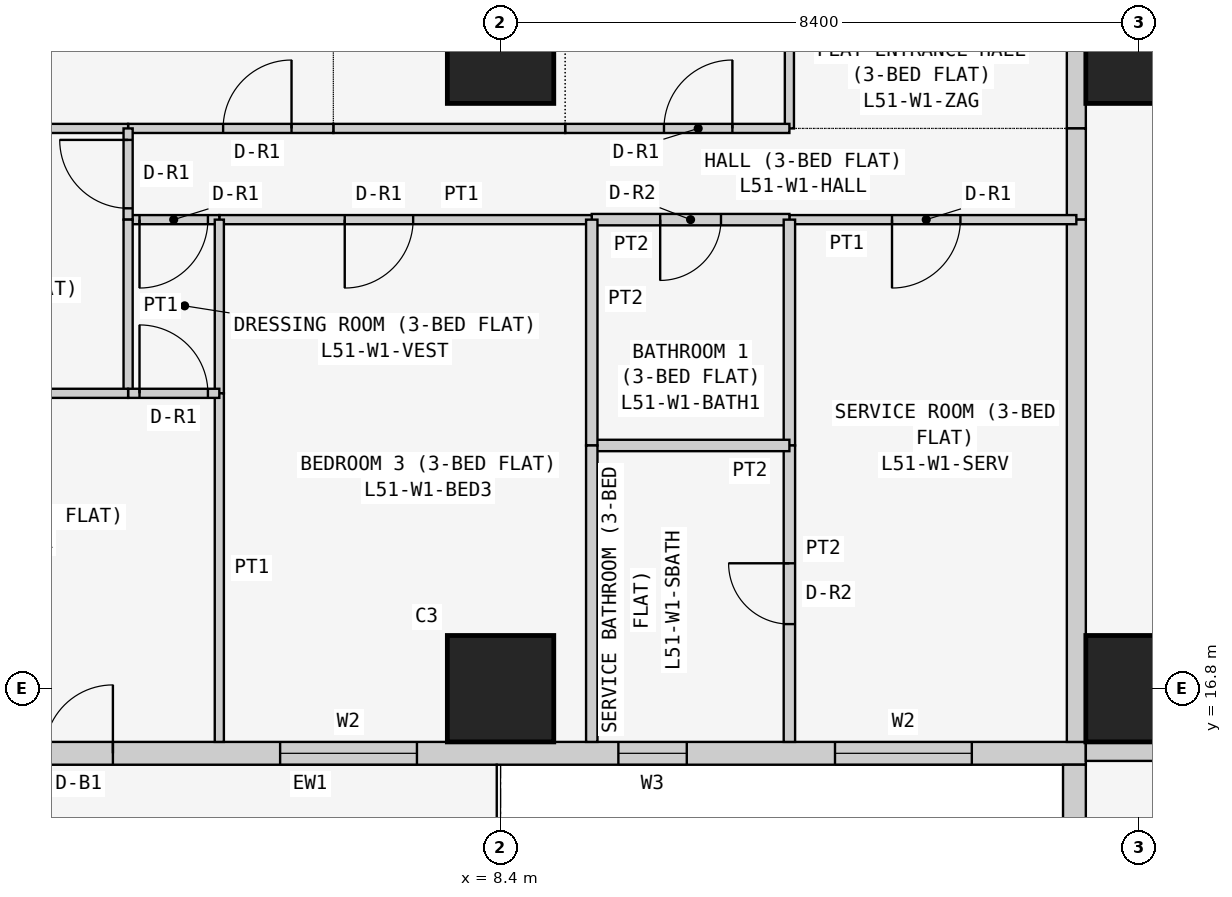
"""IFC4 building model, lengths in metres.
Left out: names, types, materials, properties, quantities, classifications, styles, units other than length and angle.
Written with IfcOpenShell. Run it as: python <this file> out.ifc"""

import sys

from ifc_helpers import new_model, si_unit, direction, frame, frame_2d, origin, origin_2d, place, context, subcontext, project, spatial, rectangle, extrude, element, fill, save


model = new_model("IFC4")
c1 = context("Model", 3, precision=1e-05, world=origin(), true_north=direction((0.0, 1.0)))
c2 = subcontext(c1, "Body", "Model", "MODEL_VIEW")
j1 = project(units=[si_unit("LENGTHUNIT", "METRE"), si_unit("PLANEANGLEUNIT", "RADIAN")], contexts=[c1])
p1 = place(None, origin())
s1 = spatial("IfcSite", under=j1, at=p1, CompositionType="ELEMENT")
p2 = place(p1, origin())
s2 = spatial("IfcBuilding", under=s1, at=p2, CompositionType="ELEMENT")
p3 = place(p2, frame((0.0, 0.0, 197.7)))
s3 = spatial("IfcBuildingStorey", under=s2, at=p3, CompositionType="ELEMENT", Elevation=197.7)
for number, where, z_axis, x_axis in (
    (1, (8.4, 16.8, 0.0), (0.0, 0.0, 1.0), (1.0, 0.0, 0.0)),
    (2, (8.4, 25.2, 0.0), (0.0, 0.0, 1.0), (1.0, 0.0, 0.0)),
    (3, (16.8, 16.8, 0.0), (0.0, 0.0, 1.0), (1.0, 0.0, 0.0)),
    (4, (16.8, 25.2, 0.0), (0.0, 0.0, 1.0), (1.0, 0.0, 0.0)),
):
    element("IfcColumn", number, at=place(p3, frame(where, z_axis=z_axis, x_axis=x_axis)), inside=s3, PredefinedType="COLUMN", context=c2, shape_type="SweptSolid", body=[
        extrude(rectangle(XDim=1.4, YDim=1.4, at=origin_2d()), origin(), (0.0, 0.0, 1.0), 3.6),
    ])
p4 = place(p3, frame((0.4, 15.95, 0.0), z_axis=(0.0, 0.0, 1.0), x_axis=(1.0, 0.0, 0.0)))
e5 = element("IfcWall", 5, at=p4, inside=s3, PredefinedType="SOLIDWALL", context=c2, shape_type="SweptSolid", body=[
    extrude(rectangle(XDim=15.7, YDim=0.3, at=frame_2d((7.85, 0.0))), origin(), (0.0, 0.0, 1.0), 3.45),
])
p5 = place(p4, frame((12.4, 0.0, 0.9)))
e6 = element("IfcOpeningElement", 6, at=p5, cuts=e5, PredefinedType="OPENING", context=c2, shape_type="SweptSolid", body=[
    extrude(rectangle(XDim=1.8, YDim=1.5, at=frame_2d((0.9, 0.75))), frame((0.0, 0.16, 0.0), z_axis=(0.0, -1.0, 0.0), x_axis=(1.0, 0.0, 0.0)), (0.0, 0.0, 1.0), 0.32),
])
p6 = place(p4, frame((9.55, 0.0, 1.5)))
e7 = element("IfcOpeningElement", 7, at=p6, cuts=e5, PredefinedType="OPENING", context=c2, shape_type="SweptSolid", body=[
    extrude(rectangle(XDim=0.9, YDim=0.7, at=frame_2d((0.45, 0.35))), frame((0.0, 0.16, 0.0), z_axis=(0.0, -1.0, 0.0), x_axis=(1.0, 0.0, 0.0)), (0.0, 0.0, 1.0), 0.32),
])
p7 = place(p4, frame((5.1, 0.0, 0.9)))
e8 = element("IfcOpeningElement", 8, at=p7, cuts=e5, PredefinedType="OPENING", context=c2, shape_type="SweptSolid", body=[
    extrude(rectangle(XDim=1.8, YDim=1.5, at=frame_2d((0.9, 0.75))), frame((0.0, 0.16, 0.0), z_axis=(0.0, -1.0, 0.0), x_axis=(1.0, 0.0, 0.0)), (0.0, 0.0, 1.0), 0.32),
])
p8 = place(p4, frame((2.0, 0.0, 0.0)))
e9 = element("IfcOpeningElement", 9, at=p8, cuts=e5, PredefinedType="OPENING", context=c2, shape_type="SweptSolid", body=[
    extrude(rectangle(XDim=0.9, YDim=2.4, at=frame_2d((0.45, 1.2))), frame((0.0, 0.16, 0.0), z_axis=(0.0, -1.0, 0.0), x_axis=(1.0, 0.0, 0.0)), (0.0, 0.0, 1.0), 0.32),
])
p9 = place(p4, frame((0.7, 0.0, 0.9)))
e10 = element("IfcOpeningElement", 10, at=p9, cuts=e5, PredefinedType="OPENING", context=c2, shape_type="SweptSolid", body=[
    extrude(rectangle(XDim=1.2, YDim=1.5, at=frame_2d((0.6, 0.75))), frame((0.0, 0.16, 0.0), z_axis=(0.0, -1.0, 0.0), x_axis=(1.0, 0.0, 0.0)), (0.0, 0.0, 1.0), 0.32),
])
p10 = place(p3, frame((15.95, 15.8, 0.0), z_axis=(0.0, 0.0, 1.0), x_axis=(0.0, -1.0, 0.0)))
e11 = element("IfcWall", 11, at=p10, inside=s3, PredefinedType="SOLIDWALL", context=c2, shape_type="SweptSolid", body=[
    extrude(rectangle(XDim=7.0, YDim=0.3, at=frame_2d((3.5, 0.0))), origin(), (0.0, 0.0, 1.0), 3.45),
])
p11 = place(p10, frame((1.5, 0.0, 0.9)))
e12 = element("IfcOpeningElement", 12, at=p11, cuts=e11, PredefinedType="OPENING", context=c2, shape_type="SweptSolid", body=[
    extrude(rectangle(XDim=2.4, YDim=1.5, at=frame_2d((1.2, 0.75))), frame((0.0, 0.16, 0.0), z_axis=(0.0, -1.0, 0.0), x_axis=(1.0, 0.0, 0.0)), (0.0, 0.0, 1.0), 0.32),
])
p12 = place(p10, frame((5.05, 0.0, 0.9)))
e13 = element("IfcOpeningElement", 13, at=p12, cuts=e11, PredefinedType="OPENING", context=c2, shape_type="SweptSolid", body=[
    extrude(rectangle(XDim=1.2, YDim=1.5, at=frame_2d((0.6, 0.75))), frame((0.0, 0.16, 0.0), z_axis=(0.0, -1.0, 0.0), x_axis=(1.0, 0.0, 0.0)), (0.0, 0.0, 1.0), 0.32),
])
p13 = place(p3, frame((22.971, 15.975, 0.0), z_axis=(0.0, 0.0, 1.0), x_axis=(-1.0, 0.0, 0.0)))
e14 = element("IfcWall", 14, at=p13, inside=s3, PredefinedType="PARTITIONING", context=c2, shape_type="SweptSolid", body=[
    extrude(rectangle(XDim=6.871, YDim=0.25, at=frame_2d((3.436, 0.0))), origin(), (0.0, 0.0, 1.0), 3.45),
])
p14 = place(p3, frame((15.975, 24.171, 0.0), z_axis=(0.0, 0.0, 1.0), x_axis=(0.0, 1.0, 0.0)))
e15 = element("IfcWall", 15, at=p14, inside=s3, PredefinedType="PARTITIONING", context=c2, shape_type="SweptSolid", body=[
    extrude(rectangle(XDim=5.229, YDim=0.25, at=frame_2d((2.615, 0.0))), origin(), (0.0, 0.0, 1.0), 3.45),
])
p15 = place(p14, frame((2.129, 0.0, 0.0)))
e16 = element("IfcOpeningElement", 16, at=p15, cuts=e15, PredefinedType="OPENING", context=c2, shape_type="SweptSolid", body=[
    extrude(rectangle(XDim=1.0, YDim=2.1, at=frame_2d((0.5, 1.05))), frame((0.0, 0.135, 0.0), z_axis=(0.0, -1.0, 0.0), x_axis=(1.0, 0.0, 0.0)), (0.0, 0.0, 1.0), 0.27),
])
p16 = place(p3, frame((15.975, 22.971, 0.0), z_axis=(0.0, 0.0, 1.0), x_axis=(0.0, 1.0, 0.0)))
e17 = element("IfcWall", 17, at=p16, inside=s3, PredefinedType="PARTITIONING", context=c2, shape_type="SweptSolid", body=[
    extrude(rectangle(XDim=1.2, YDim=0.25, at=frame_2d((0.6, 0.0))), origin(), (0.0, 0.0, 1.0), 3.45),
])
p17 = place(p3, frame((15.975, 16.1, 0.0), z_axis=(0.0, 0.0, 1.0), x_axis=(0.0, 1.0, 0.0)))
e18 = element("IfcWall", 18, at=p17, inside=s3, PredefinedType="PARTITIONING", context=c2, shape_type="SweptSolid", body=[
    extrude(rectangle(XDim=6.871, YDim=0.25, at=frame_2d((3.436, 0.0))), origin(), (0.0, 0.0, 1.0), 3.45),
])
p18 = place(p3, frame((12.2, 29.4, 0.0), z_axis=(0.0, 0.0, 1.0), x_axis=(0.0, -1.0, 0.0)))
e19 = element("IfcWall", 19, at=p18, inside=s3, PredefinedType="PARTITIONING", context=c2, shape_type="SweptSolid", body=[
    extrude(rectangle(XDim=5.229, YDim=0.12, at=frame_2d((2.615, 0.0))), origin(), (0.0, 0.0, 1.0), 3.45),
])
p19 = place(p3, frame((9.25, 24.171, 0.0), z_axis=(0.0, 0.0, 1.0), x_axis=(1.0, 0.0, 0.0)))
e20 = element("IfcWall", 20, at=p19, inside=s3, PredefinedType="PARTITIONING", context=c2, shape_type="SweptSolid", body=[
    extrude(rectangle(XDim=2.95, YDim=0.12, at=frame_2d((1.475, 0.0))), origin(), (0.0, 0.0, 1.0), 3.45),
])
p20 = place(p19, frame((1.3, 0.0, 0.0)))
e21 = element("IfcOpeningElement", 21, at=p20, cuts=e20, PredefinedType="OPENING", context=c2, shape_type="SweptSolid", body=[
    extrude(rectangle(XDim=0.9, YDim=2.1, at=frame_2d((0.45, 1.05))), frame((0.0, 0.07, 0.0), z_axis=(0.0, -1.0, 0.0), x_axis=(1.0, 0.0, 0.0)), (0.0, 0.0, 1.0), 0.14),
])
p21 = place(p3, frame((6.2, 24.171, 0.0), z_axis=(0.0, 0.0, 1.0), x_axis=(1.0, 0.0, 0.0)))
e22 = element("IfcWall", 22, at=p21, inside=s3, PredefinedType="PARTITIONING", context=c2, shape_type="SweptSolid", body=[
    extrude(rectangle(XDim=3.05, YDim=0.12, at=frame_2d((1.525, 0.0))), origin(), (0.0, 0.0, 1.0), 3.45),
])
p22 = place(p3, frame((3.5, 24.171, 0.0), z_axis=(0.0, 0.0, 1.0), x_axis=(1.0, 0.0, 0.0)))
e23 = element("IfcWall", 23, at=p22, inside=s3, PredefinedType="PARTITIONING", context=c2, shape_type="SweptSolid", body=[
    extrude(rectangle(XDim=2.7, YDim=0.12, at=frame_2d((1.35, 0.0))), origin(), (0.0, 0.0, 1.0), 3.45),
])
p23 = place(p22, frame((1.25, 0.0, 0.0)))
e24 = element("IfcOpeningElement", 24, at=p23, cuts=e23, PredefinedType="OPENING", context=c2, shape_type="SweptSolid", body=[
    extrude(rectangle(XDim=0.9, YDim=2.1, at=frame_2d((0.45, 1.05))), frame((0.0, 0.07, 0.0), z_axis=(0.0, -1.0, 0.0), x_axis=(1.0, 0.0, 0.0)), (0.0, 0.0, 1.0), 0.14),
])
p24 = place(p3, frame((-0.65, 24.171, 0.0), z_axis=(0.0, 0.0, 1.0), x_axis=(1.0, 0.0, 0.0)))
e25 = element("IfcWall", 25, at=p24, inside=s3, PredefinedType="PARTITIONING", context=c2, shape_type="SweptSolid", body=[
    extrude(rectangle(XDim=4.15, YDim=0.12, at=frame_2d((2.075, 0.0))), origin(), (0.0, 0.0, 1.0), 3.45),
])
p25 = place(p3, frame((12.2, 22.971, 0.0), z_axis=(0.0, 0.0, 1.0), x_axis=(1.0, 0.0, 0.0)))
e26 = element("IfcWall", 26, at=p25, inside=s3, PredefinedType="PARTITIONING", context=c2, shape_type="SweptSolid", body=[
    extrude(rectangle(XDim=3.775, YDim=0.12, at=frame_2d((1.888, 0.0))), origin(), (0.0, 0.0, 1.0), 3.45),
])
p26 = place(p25, frame((1.35, 0.0, 0.0)))
e27 = element("IfcOpeningElement", 27, at=p26, cuts=e26, PredefinedType="OPENING", context=c2, shape_type="SweptSolid", body=[
    extrude(rectangle(XDim=0.9, YDim=2.1, at=frame_2d((0.45, 1.05))), frame((0.0, 0.07, 0.0), z_axis=(0.0, -1.0, 0.0), x_axis=(1.0, 0.0, 0.0)), (0.0, 0.0, 1.0), 0.14),
])
p27 = place(p3, frame((9.6, 22.971, 0.0), z_axis=(0.0, 0.0, 1.0), x_axis=(1.0, 0.0, 0.0)))
e28 = element("IfcWall", 28, at=p27, inside=s3, PredefinedType="PARTITIONING", context=c2, shape_type="SweptSolid", body=[
    extrude(rectangle(XDim=2.6, YDim=0.15, at=frame_2d((1.3, 0.0))), origin(), (0.0, 0.0, 1.0), 3.45),
])
p28 = place(p27, frame((0.9, 0.0, 0.0)))
e29 = element("IfcOpeningElement", 29, at=p28, cuts=e28, PredefinedType="OPENING", context=c2, shape_type="SweptSolid", body=[
    extrude(rectangle(XDim=0.8, YDim=2.1, at=frame_2d((0.4, 1.05))), frame((0.0, 0.085, 0.0), z_axis=(0.0, -1.0, 0.0), x_axis=(1.0, 0.0, 0.0)), (0.0, 0.0, 1.0), 0.17),
])
p29 = place(p3, frame((4.7, 22.971, 0.0), z_axis=(0.0, 0.0, 1.0), x_axis=(1.0, 0.0, 0.0)))
e30 = element("IfcWall", 30, at=p29, inside=s3, PredefinedType="PARTITIONING", context=c2, shape_type="SweptSolid", body=[
    extrude(rectangle(XDim=4.9, YDim=0.12, at=frame_2d((2.45, 0.0))), origin(), (0.0, 0.0, 1.0), 3.45),
])
p30 = place(p29, frame((1.65, 0.0, 0.0)))
e31 = element("IfcOpeningElement", 31, at=p30, cuts=e30, PredefinedType="OPENING", context=c2, shape_type="SweptSolid", body=[
    extrude(rectangle(XDim=0.9, YDim=2.1, at=frame_2d((0.45, 1.05))), frame((0.0, 0.07, 0.0), z_axis=(0.0, -1.0, 0.0), x_axis=(1.0, 0.0, 0.0)), (0.0, 0.0, 1.0), 0.14),
])
p31 = place(p3, frame((3.5, 22.971, 0.0), z_axis=(0.0, 0.0, 1.0), x_axis=(1.0, 0.0, 0.0)))
e32 = element("IfcWall", 32, at=p31, inside=s3, PredefinedType="PARTITIONING", context=c2, shape_type="SweptSolid", body=[
    extrude(rectangle(XDim=1.2, YDim=0.12, at=frame_2d((0.6, 0.0))), origin(), (0.0, 0.0, 1.0), 3.45),
])
p32 = place(p31, frame((0.15, 0.0, 0.0)))
e33 = element("IfcOpeningElement", 33, at=p32, cuts=e32, PredefinedType="OPENING", context=c2, shape_type="SweptSolid", body=[
    extrude(rectangle(XDim=0.9, YDim=2.1, at=frame_2d((0.45, 1.05))), frame((0.0, 0.07, 0.0), z_axis=(0.0, -1.0, 0.0), x_axis=(1.0, 0.0, 0.0)), (0.0, 0.0, 1.0), 0.14),
])
p33 = place(p3, frame((3.5, 24.171, 0.0), z_axis=(0.0, 0.0, 1.0), x_axis=(0.0, -1.0, 0.0)))
e34 = element("IfcWall", 34, at=p33, inside=s3, PredefinedType="PARTITIONING", context=c2, shape_type="SweptSolid", body=[
    extrude(rectangle(XDim=1.2, YDim=0.12, at=frame_2d((0.6, 0.0))), origin(), (0.0, 0.0, 1.0), 3.45),
])
p34 = place(p33, frame((0.151, 0.0, 0.0)))
e35 = element("IfcOpeningElement", 35, at=p34, cuts=e34, PredefinedType="OPENING", context=c2, shape_type="SweptSolid", body=[
    extrude(rectangle(XDim=0.9, YDim=2.1, at=frame_2d((0.45, 1.05))), frame((0.0, 0.07, 0.0), z_axis=(0.0, -1.0, 0.0), x_axis=(1.0, 0.0, 0.0)), (0.0, 0.0, 1.0), 0.14),
])
p35 = place(p3, frame((12.2, 22.971, 0.0), z_axis=(0.0, 0.0, 1.0), x_axis=(0.0, -1.0, 0.0)))
e36 = element("IfcWall", 36, at=p35, inside=s3, PredefinedType="PARTITIONING", context=c2, shape_type="SweptSolid", body=[
    extrude(rectangle(XDim=2.971, YDim=0.15, at=frame_2d((1.485, 0.0))), origin(), (0.0, 0.0, 1.0), 3.45),
])
p36 = place(p3, frame((12.2, 20.0, 0.0), z_axis=(0.0, 0.0, 1.0), x_axis=(0.0, -1.0, 0.0)))
e37 = element("IfcWall", 37, at=p36, inside=s3, PredefinedType="PARTITIONING", context=c2, shape_type="SweptSolid", body=[
    extrude(rectangle(XDim=3.9, YDim=0.15, at=frame_2d((1.95, 0.0))), origin(), (0.0, 0.0, 1.0), 3.45),
])
p37 = place(p36, frame((1.55, 0.0, 0.0)))
e38 = element("IfcOpeningElement", 38, at=p37, cuts=e37, PredefinedType="OPENING", context=c2, shape_type="SweptSolid", body=[
    extrude(rectangle(XDim=0.8, YDim=2.1, at=frame_2d((0.4, 1.05))), frame((0.0, 0.085, 0.0), z_axis=(0.0, -1.0, 0.0), x_axis=(1.0, 0.0, 0.0)), (0.0, 0.0, 1.0), 0.17),
])
p38 = place(p3, frame((9.6, 20.0, 0.0), z_axis=(0.0, 0.0, 1.0), x_axis=(1.0, 0.0, 0.0)))
e39 = element("IfcWall", 39, at=p38, inside=s3, PredefinedType="PARTITIONING", context=c2, shape_type="SweptSolid", body=[
    extrude(rectangle(XDim=2.6, YDim=0.15, at=frame_2d((1.3, 0.0))), origin(), (0.0, 0.0, 1.0), 3.45),
])
p39 = place(p3, frame((9.6, 22.971, 0.0), z_axis=(0.0, 0.0, 1.0), x_axis=(0.0, -1.0, 0.0)))
e40 = element("IfcWall", 40, at=p39, inside=s3, PredefinedType="PARTITIONING", context=c2, shape_type="SweptSolid", body=[
    extrude(rectangle(XDim=2.971, YDim=0.15, at=frame_2d((1.485, 0.0))), origin(), (0.0, 0.0, 1.0), 3.45),
])
p40 = place(p3, frame((9.6, 20.0, 0.0), z_axis=(0.0, 0.0, 1.0), x_axis=(0.0, -1.0, 0.0)))
e41 = element("IfcWall", 41, at=p40, inside=s3, PredefinedType="PARTITIONING", context=c2, shape_type="SweptSolid", body=[
    extrude(rectangle(XDim=3.9, YDim=0.15, at=frame_2d((1.95, 0.0))), origin(), (0.0, 0.0, 1.0), 3.45),
])
p41 = place(p3, frame((4.7, 22.971, 0.0), z_axis=(0.0, 0.0, 1.0), x_axis=(0.0, -1.0, 0.0)))
e42 = element("IfcWall", 42, at=p41, inside=s3, PredefinedType="PARTITIONING", context=c2, shape_type="SweptSolid", body=[
    extrude(rectangle(XDim=2.285, YDim=0.12, at=frame_2d((1.143, 0.0))), origin(), (0.0, 0.0, 1.0), 3.45),
])
p42 = place(p3, frame((4.7, 20.686, 0.0), z_axis=(0.0, 0.0, 1.0), x_axis=(0.0, -1.0, 0.0)))
e43 = element("IfcWall", 43, at=p42, inside=s3, PredefinedType="PARTITIONING", context=c2, shape_type="SweptSolid", body=[
    extrude(rectangle(XDim=4.586, YDim=0.12, at=frame_2d((2.293, 0.0))), origin(), (0.0, 0.0, 1.0), 3.45),
])
p43 = place(p3, frame((3.5, 22.971, 0.0), z_axis=(0.0, 0.0, 1.0), x_axis=(0.0, -1.0, 0.0)))
e44 = element("IfcWall", 44, at=p43, inside=s3, PredefinedType="PARTITIONING", context=c2, shape_type="SweptSolid", body=[
    extrude(rectangle(XDim=2.285, YDim=0.12, at=frame_2d((1.143, 0.0))), origin(), (0.0, 0.0, 1.0), 3.45),
])
p44 = place(p3, frame((3.5, 20.686, 0.0), z_axis=(0.0, 0.0, 1.0), x_axis=(1.0, 0.0, 0.0)))
e45 = element("IfcWall", 45, at=p44, inside=s3, PredefinedType="PARTITIONING", context=c2, shape_type="SweptSolid", body=[
    extrude(rectangle(XDim=1.2, YDim=0.12, at=frame_2d((0.6, 0.0))), origin(), (0.0, 0.0, 1.0), 3.45),
])
p45 = place(p44, frame((0.15, 0.0, 0.0)))
e46 = element("IfcOpeningElement", 46, at=p45, cuts=e45, PredefinedType="OPENING", context=c2, shape_type="SweptSolid", body=[
    extrude(rectangle(XDim=0.9, YDim=2.1, at=frame_2d((0.45, 1.05))), frame((0.0, 0.07, 0.0), z_axis=(0.0, -1.0, 0.0), x_axis=(1.0, 0.0, 0.0)), (0.0, 0.0, 1.0), 0.14),
])
p46 = place(p3, frame((-0.65, 20.686, 0.0), z_axis=(0.0, 0.0, 1.0), x_axis=(1.0, 0.0, 0.0)))
e47 = element("IfcWall", 47, at=p46, inside=s3, PredefinedType="PARTITIONING", context=c2, shape_type="SweptSolid", body=[
    extrude(rectangle(XDim=4.15, YDim=0.12, at=frame_2d((2.075, 0.0))), origin(), (0.0, 0.0, 1.0), 3.45),
])
p47 = place(p5, origin())
e48 = element("IfcWindow", 48, at=p47, inside=s3, PartitioningType="SINGLE_PANEL", PredefinedType="WINDOW", context=c2, shape_type="SweptSolid", body=[
    extrude(rectangle(XDim=1.8, YDim=1.5, at=frame_2d((0.9, 0.75))), frame((0.0, 0.03, 0.0), z_axis=(0.0, -1.0, 0.0), x_axis=(1.0, 0.0, 0.0)), (0.0, 0.0, 1.0), 0.06),
])
fill(e6, e48)
p48 = place(p6, origin())
e49 = element("IfcWindow", 49, at=p48, inside=s3, PartitioningType="SINGLE_PANEL", PredefinedType="WINDOW", context=c2, shape_type="SweptSolid", body=[
    extrude(rectangle(XDim=0.9, YDim=0.7, at=frame_2d((0.45, 0.35))), frame((0.0, 0.03, 0.0), z_axis=(0.0, -1.0, 0.0), x_axis=(1.0, 0.0, 0.0)), (0.0, 0.0, 1.0), 0.06),
])
fill(e7, e49)
p49 = place(p7, origin())
e50 = element("IfcWindow", 50, at=p49, inside=s3, PartitioningType="SINGLE_PANEL", PredefinedType="WINDOW", context=c2, shape_type="SweptSolid", body=[
    extrude(rectangle(XDim=1.8, YDim=1.5, at=frame_2d((0.9, 0.75))), frame((0.0, 0.03, 0.0), z_axis=(0.0, -1.0, 0.0), x_axis=(1.0, 0.0, 0.0)), (0.0, 0.0, 1.0), 0.06),
])
fill(e8, e50)
p50 = place(p8, origin())
e51 = element("IfcDoor", 51, at=p50, inside=s3, OperationType="SINGLE_SWING_RIGHT", PredefinedType="DOOR", context=c2, shape_type="SweptSolid", body=[
    extrude(rectangle(XDim=0.9, YDim=2.4, at=frame_2d((0.45, 1.2))), frame((0.0, 0.025, 0.0), z_axis=(0.0, -1.0, 0.0), x_axis=(1.0, 0.0, 0.0)), (0.0, 0.0, 1.0), 0.05),
])
fill(e9, e51)
p51 = place(p20, origin())
e52 = element("IfcDoor", 52, at=p51, inside=s3, OperationType="SINGLE_SWING_RIGHT", PredefinedType="DOOR", context=c2, shape_type="SweptSolid", body=[
    extrude(rectangle(XDim=0.9, YDim=2.1, at=frame_2d((0.45, 1.05))), frame((0.0, 0.025, 0.0), z_axis=(0.0, -1.0, 0.0), x_axis=(1.0, 0.0, 0.0)), (0.0, 0.0, 1.0), 0.05),
])
fill(e21, e52)
p52 = place(p23, origin())
e53 = element("IfcDoor", 53, at=p52, inside=s3, OperationType="SINGLE_SWING_RIGHT", PredefinedType="DOOR", context=c2, shape_type="SweptSolid", body=[
    extrude(rectangle(XDim=0.9, YDim=2.1, at=frame_2d((0.45, 1.05))), frame((0.0, 0.025, 0.0), z_axis=(0.0, -1.0, 0.0), x_axis=(1.0, 0.0, 0.0)), (0.0, 0.0, 1.0), 0.05),
])
fill(e24, e53)
p53 = place(p26, frame((0.9, 0.0, 0.0), z_axis=(0.0, 0.0, 1.0), x_axis=(-1.0, 0.0, 0.0)))
e54 = element("IfcDoor", 54, at=p53, inside=s3, OperationType="SINGLE_SWING_RIGHT", PredefinedType="DOOR", context=c2, shape_type="SweptSolid", body=[
    extrude(rectangle(XDim=0.9, YDim=2.1, at=frame_2d((0.45, 1.05))), frame((0.0, 0.025, 0.0), z_axis=(0.0, -1.0, 0.0), x_axis=(1.0, 0.0, 0.0)), (0.0, 0.0, 1.0), 0.05),
])
fill(e27, e54)
p54 = place(p37, frame((0.8, 0.0, 0.0), z_axis=(0.0, 0.0, 1.0), x_axis=(-1.0, 0.0, 0.0)))
e55 = element("IfcDoor", 55, at=p54, inside=s3, OperationType="SINGLE_SWING_RIGHT", PredefinedType="DOOR", context=c2, shape_type="SweptSolid", body=[
    extrude(rectangle(XDim=0.8, YDim=2.1, at=frame_2d((0.4, 1.05))), frame((0.0, 0.025, 0.0), z_axis=(0.0, -1.0, 0.0), x_axis=(1.0, 0.0, 0.0)), (0.0, 0.0, 1.0), 0.05),
])
fill(e38, e55)
p55 = place(p28, frame((0.8, 0.0, 0.0), z_axis=(0.0, 0.0, 1.0), x_axis=(-1.0, 0.0, 0.0)))
e56 = element("IfcDoor", 56, at=p55, inside=s3, OperationType="SINGLE_SWING_RIGHT", PredefinedType="DOOR", context=c2, shape_type="SweptSolid", body=[
    extrude(rectangle(XDim=0.8, YDim=2.1, at=frame_2d((0.4, 1.05))), frame((0.0, 0.025, 0.0), z_axis=(0.0, -1.0, 0.0), x_axis=(1.0, 0.0, 0.0)), (0.0, 0.0, 1.0), 0.05),
])
fill(e29, e56)
p56 = place(p30, frame((0.9, 0.0, 0.0), z_axis=(0.0, 0.0, 1.0), x_axis=(-1.0, 0.0, 0.0)))
e57 = element("IfcDoor", 57, at=p56, inside=s3, OperationType="SINGLE_SWING_RIGHT", PredefinedType="DOOR", context=c2, shape_type="SweptSolid", body=[
    extrude(rectangle(XDim=0.9, YDim=2.1, at=frame_2d((0.45, 1.05))), frame((0.0, 0.025, 0.0), z_axis=(0.0, -1.0, 0.0), x_axis=(1.0, 0.0, 0.0)), (0.0, 0.0, 1.0), 0.05),
])
fill(e31, e57)
p57 = place(p32, frame((0.9, 0.0, 0.0), z_axis=(0.0, 0.0, 1.0), x_axis=(-1.0, 0.0, 0.0)))
e58 = element("IfcDoor", 58, at=p57, inside=s3, OperationType="SINGLE_SWING_RIGHT", PredefinedType="DOOR", context=c2, shape_type="SweptSolid", body=[
    extrude(rectangle(XDim=0.9, YDim=2.1, at=frame_2d((0.45, 1.05))), frame((0.0, 0.025, 0.0), z_axis=(0.0, -1.0, 0.0), x_axis=(1.0, 0.0, 0.0)), (0.0, 0.0, 1.0), 0.05),
])
fill(e33, e58)
p58 = place(p45, origin())
e59 = element("IfcDoor", 59, at=p58, inside=s3, OperationType="SINGLE_SWING_LEFT", PredefinedType="DOOR", context=c2, shape_type="SweptSolid", body=[
    extrude(rectangle(XDim=0.9, YDim=2.1, at=frame_2d((0.45, 1.05))), frame((0.0, 0.025, 0.0), z_axis=(0.0, -1.0, 0.0), x_axis=(1.0, 0.0, 0.0)), (0.0, 0.0, 1.0), 0.05),
])
fill(e46, e59)
p59 = place(p34, frame((0.9, 0.0, 0.0), z_axis=(0.0, 0.0, 1.0), x_axis=(-1.0, 0.0, 0.0)))
e60 = element("IfcDoor", 60, at=p59, inside=s3, OperationType="SINGLE_SWING_RIGHT", PredefinedType="DOOR", context=c2, shape_type="SweptSolid", body=[
    extrude(rectangle(XDim=0.9, YDim=2.1, at=frame_2d((0.45, 1.05))), frame((0.0, 0.025, 0.0), z_axis=(0.0, -1.0, 0.0), x_axis=(1.0, 0.0, 0.0)), (0.0, 0.0, 1.0), 0.05),
])
fill(e35, e60)
save(model, sys.argv[1])
